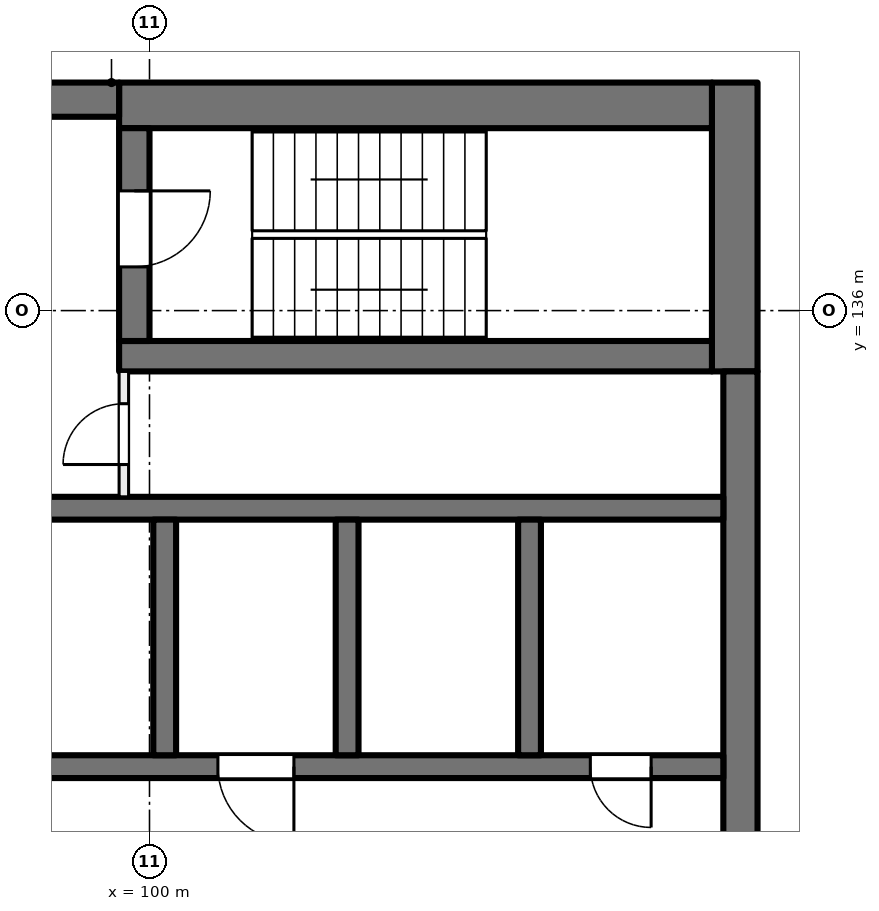
"""IFC4 building model, lengths in metres.
Left out: names, types, materials, properties, quantities, classifications, styles, units other than length and angle.
Written with IfcOpenShell. Run it as: python <this file> out.ifc"""

import sys

from ifc_helpers import new_model, si_unit, direction, frame, frame_2d, origin, place, context, subcontext, project, spatial, rectangle, extrude, element, fill, save


model = new_model("IFC4")
c1 = context("Model", 3, precision=1e-05, world=origin(), true_north=direction((0.0, 1.0)))
c2 = subcontext(c1, "Body", "Model", "MODEL_VIEW")
j1 = project(units=[si_unit("LENGTHUNIT", "METRE"), si_unit("PLANEANGLEUNIT", "RADIAN")], contexts=[c1])
p1 = place(None, origin())
s1 = spatial("IfcSite", under=j1, at=p1, CompositionType="ELEMENT")
p2 = place(p1, origin())
s2 = spatial("IfcBuilding", under=s1, at=p2, CompositionType="ELEMENT")
p3 = place(p2, frame((0.0, 0.0, 241.5)))
s3 = spatial("IfcBuildingStorey", under=s2, at=p3, CompositionType="ELEMENT", Elevation=241.5)
p4 = place(p3, frame((107.7, 139.0, 0.0), z_axis=(0.0, 0.0, 1.0), x_axis=(0.0, -1.0, 0.0)))
e1 = element("IfcWall", 1, at=p4, inside=s3, PredefinedType="SHEAR", context=c2, shape_type="SweptSolid", body=[
    extrude(rectangle(XDim=3.8, YDim=0.6, at=frame_2d((1.9, 0.0))), origin(), (0.0, 0.0, 1.0), 4.0),
])
p5 = place(p3, frame((107.775, 135.2, 0.0), z_axis=(0.0, 0.0, 1.0), x_axis=(0.0, -1.0, 0.0)))
e2 = element("IfcWall", 2, at=p5, inside=s3, PredefinedType="SHEAR", context=c2, shape_type="SweptSolid", body=[
    extrude(rectangle(XDim=14.4, YDim=0.45, at=frame_2d((7.2, 0.0))), origin(), (0.0, 0.0, 1.0), 4.0),
])
p6 = place(p3, frame((107.4, 138.7, 0.0), z_axis=(0.0, 0.0, 1.0), x_axis=(-1.0, 0.0, 0.0)))
e3 = element("IfcWall", 3, at=p6, inside=s3, PredefinedType="SHEAR", context=c2, shape_type="SweptSolid", body=[
    extrude(rectangle(XDim=7.8, YDim=0.6, at=frame_2d((3.9, 0.0))), origin(), (0.0, 0.0, 1.0), 4.0),
])
p7 = place(p3, frame((99.6, 138.775, 0.0), z_axis=(0.0, 0.0, 1.0), x_axis=(-1.0, 0.0, 0.0)))
e4 = element("IfcWall", 4, at=p7, inside=s3, PredefinedType="SHEAR", context=c2, shape_type="SweptSolid", body=[
    extrude(rectangle(XDim=9.0, YDim=0.45, at=frame_2d((4.5, 0.0))), origin(), (0.0, 0.0, 1.0), 4.0),
])
p8 = place(p3, frame((107.4, 135.4, 0.0), z_axis=(0.0, 0.0, 1.0), x_axis=(-1.0, 0.0, 0.0)))
e5 = element("IfcWall", 5, at=p8, inside=s3, PredefinedType="SHEAR", context=c2, shape_type="SweptSolid", body=[
    extrude(rectangle(XDim=7.8, YDim=0.4, at=frame_2d((3.9, 0.0))), origin(), (0.0, 0.0, 1.0), 4.0),
])
p9 = place(p3, frame((99.8, 138.4, 0.0), z_axis=(0.0, 0.0, 1.0), x_axis=(0.0, -1.0, 0.0)))
e6 = element("IfcWall", 6, at=p9, inside=s3, PredefinedType="SHEAR", context=c2, shape_type="SweptSolid", body=[
    extrude(rectangle(XDim=2.8, YDim=0.4, at=frame_2d((1.4, 0.0))), origin(), (0.0, 0.0, 1.0), 4.0),
])
p10 = place(p9, frame((0.825, 0.0, 0.0)))
e7 = element("IfcOpeningElement", 7, at=p10, cuts=e6, PredefinedType="OPENING", context=c2, shape_type="SweptSolid", body=[
    extrude(rectangle(XDim=1.0, YDim=2.1, at=frame_2d((0.5, 1.05))), frame((0.0, 0.21, 0.0), z_axis=(0.0, -1.0, 0.0), x_axis=(1.0, 0.0, 0.0)), (0.0, 0.0, 1.0), 0.42),
])
p11 = place(p3, frame((107.55, 130.0, 0.0), z_axis=(0.0, 0.0, 1.0), x_axis=(-1.0, 0.0, 0.0)))
e8 = element("IfcWall", 8, at=p11, inside=s3, PredefinedType="SHEAR", context=c2, shape_type="SweptSolid", body=[
    extrude(rectangle(XDim=12.3, YDim=0.3, at=frame_2d((6.15, 0.0))), origin(), (0.0, 0.0, 1.0), 4.0),
])
p12 = place(p11, frame((0.95, 0.0, 0.0)))
e9 = element("IfcOpeningElement", 9, at=p12, cuts=e8, PredefinedType="OPENING", context=c2, shape_type="SweptSolid", body=[
    extrude(rectangle(XDim=0.8, YDim=2.1, at=frame_2d((0.4, 1.05))), frame((0.0, 0.16, 0.0), z_axis=(0.0, -1.0, 0.0), x_axis=(1.0, 0.0, 0.0)), (0.0, 0.0, 1.0), 0.32),
])
p13 = place(p11, frame((5.65, 0.0, 0.0)))
e10 = element("IfcOpeningElement", 10, at=p13, cuts=e8, PredefinedType="OPENING", context=c2, shape_type="SweptSolid", body=[
    extrude(rectangle(XDim=1.0, YDim=2.1, at=frame_2d((0.5, 1.05))), frame((0.0, 0.16, 0.0), z_axis=(0.0, -1.0, 0.0), x_axis=(1.0, 0.0, 0.0)), (0.0, 0.0, 1.0), 0.32),
])
p14 = place(p3, frame((107.55, 133.4, 0.0), z_axis=(0.0, 0.0, 1.0), x_axis=(-1.0, 0.0, 0.0)))
e11 = element("IfcWall", 11, at=p14, inside=s3, PredefinedType="SHEAR", context=c2, shape_type="SweptSolid", body=[
    extrude(rectangle(XDim=12.3, YDim=0.3, at=frame_2d((6.15, 0.0))), origin(), (0.0, 0.0, 1.0), 4.0),
])
p15 = place(p14, frame((10.45, 0.0, 0.0)))
e12 = element("IfcOpeningElement", 12, at=p15, cuts=e11, PredefinedType="OPENING", context=c2, shape_type="SweptSolid", body=[
    extrude(rectangle(XDim=1.1, YDim=2.1, at=frame_2d((0.55, 1.05))), frame((0.0, 0.16, 0.0), z_axis=(0.0, -1.0, 0.0), x_axis=(1.0, 0.0, 0.0)), (0.0, 0.0, 1.0), 0.32),
])
for number, where, z_axis, x_axis in (
    (13, (105.0, 133.25, 0.0), (0.0, 0.0, 1.0), (0.0, -1.0, 0.0)),
    (14, (102.6, 133.25, 0.0), (0.0, 0.0, 1.0), (0.0, -1.0, 0.0)),
    (15, (100.2, 133.25, 0.0), (0.0, 0.0, 1.0), (0.0, -1.0, 0.0)),
):
    element("IfcWall", number, at=place(p3, frame(where, z_axis=z_axis, x_axis=x_axis)), inside=s3, PredefinedType="SHEAR", context=c2, shape_type="SweptSolid", body=[
        extrude(rectangle(XDim=3.1, YDim=0.3, at=frame_2d((1.55, 0.0))), origin(), (0.0, 0.0, 1.0), 4.0),
    ])
p16 = place(p3, frame((99.663, 133.55, 0.0), z_axis=(0.0, 0.0, 1.0), x_axis=(0.0, 1.0, 0.0)))
e16 = element("IfcWall", 16, at=p16, inside=s3, PredefinedType="PARTITIONING", context=c2, shape_type="SweptSolid", body=[
    extrude(rectangle(XDim=1.65, YDim=0.125, at=frame_2d((0.825, 0.0))), origin(), (0.0, 0.0, 1.0), 3.625),
])
p17 = place(p16, frame((0.425, 0.0, 0.0)))
e17 = element("IfcOpeningElement", 17, at=p17, cuts=e16, PredefinedType="OPENING", context=c2, shape_type="SweptSolid", body=[
    extrude(rectangle(XDim=0.8, YDim=2.1, at=frame_2d((0.4, 1.05))), frame((0.0, 0.073, 0.0), z_axis=(0.0, -1.0, 0.0), x_axis=(1.0, 0.0, 0.0)), (0.0, 0.0, 1.0), 0.145),
])
p18 = place(p12, origin())
e18 = element("IfcDoor", 18, at=p18, inside=s3, OperationType="SINGLE_SWING_LEFT", PredefinedType="DOOR", context=c2, shape_type="SweptSolid", body=[
    extrude(rectangle(XDim=0.8, YDim=2.1, at=frame_2d((0.4, 1.05))), frame((0.0, 0.025, 0.0), z_axis=(0.0, -1.0, 0.0), x_axis=(1.0, 0.0, 0.0)), (0.0, 0.0, 1.0), 0.05),
])
fill(e9, e18)
p19 = place(p13, origin())
e19 = element("IfcDoor", 19, at=p19, inside=s3, OperationType="SINGLE_SWING_RIGHT", PredefinedType="DOOR", context=c2, shape_type="SweptSolid", body=[
    extrude(rectangle(XDim=1.0, YDim=2.1, at=frame_2d((0.5, 1.05))), frame((0.0, 0.025, 0.0), z_axis=(0.0, -1.0, 0.0), x_axis=(1.0, 0.0, 0.0)), (0.0, 0.0, 1.0), 0.05),
])
fill(e10, e19)
p20 = place(p10, origin())
e20 = element("IfcDoor", 20, at=p20, inside=s3, OperationType="SINGLE_SWING_RIGHT", PredefinedType="DOOR", context=c2, shape_type="SweptSolid", body=[
    extrude(rectangle(XDim=1.0, YDim=2.1, at=frame_2d((0.5, 1.05))), frame((0.0, 0.025, 0.0), z_axis=(0.0, -1.0, 0.0), x_axis=(1.0, 0.0, 0.0)), (0.0, 0.0, 1.0), 0.05),
])
fill(e7, e20)
p21 = place(p17, origin())
e21 = element("IfcDoor", 21, at=p21, inside=s3, OperationType="SINGLE_SWING_LEFT", PredefinedType="DOOR", context=c2, shape_type="SweptSolid", body=[
    extrude(rectangle(XDim=0.8, YDim=2.1, at=frame_2d((0.4, 1.05))), frame((0.0, 0.025, 0.0), z_axis=(0.0, -1.0, 0.0), x_axis=(1.0, 0.0, 0.0)), (0.0, 0.0, 1.0), 0.05),
])
fill(e17, e21)
save(model, sys.argv[1])
